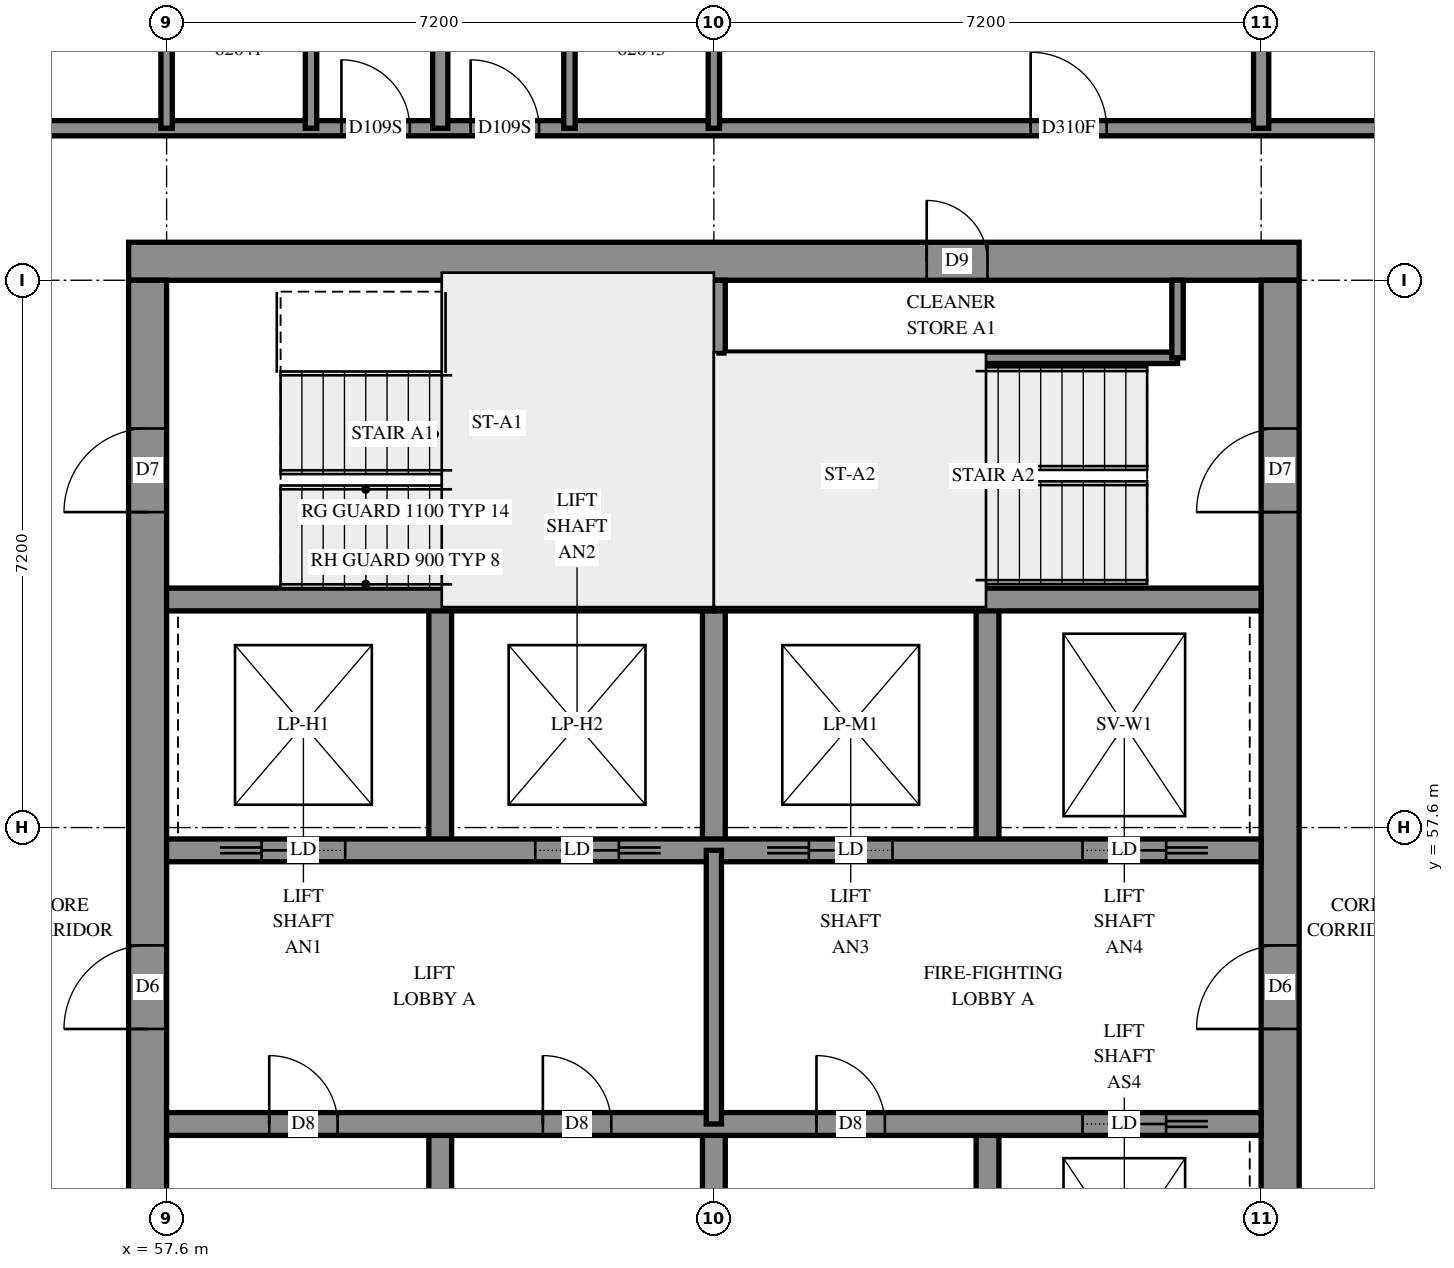
"""IFC4 building model, lengths in metres.
Left out: names, types, materials, properties, quantities, classifications, styles, units other than length and angle.
Written with IfcOpenShell. Run it as: python <this file> out.ifc"""

import sys

from ifc_helpers import new_model, si_unit, direction, frame, frame_2d, origin, place, context, subcontext, project, spatial, rectangle, extrude, element, fill, save


model = new_model("IFC4")
c1 = context("Model", 3, precision=1e-05, world=origin(), true_north=direction((0.0, 1.0)))
c2 = subcontext(c1, "Body", "Model", "MODEL_VIEW")
j1 = project(units=[si_unit("LENGTHUNIT", "METRE"), si_unit("PLANEANGLEUNIT", "RADIAN")], contexts=[c1])
p1 = place(None, origin())
s1 = spatial("IfcSite", under=j1, at=p1, CompositionType="ELEMENT")
p2 = place(p1, origin())
s2 = spatial("IfcBuilding", under=s1, at=p2, CompositionType="ELEMENT")
p3 = place(p2, frame((0.0, 0.0, 227.0)))
s3 = spatial("IfcBuildingStorey", under=s2, at=p3, CompositionType="ELEMENT", Elevation=227.0)
p4 = place(p3, frame((57.1, 65.05, -0.3), z_axis=(0.0, 0.0, 1.0), x_axis=(1.0, 0.0, 0.0)))
e1 = element("IfcWall", 1, at=p4, inside=s3, PredefinedType="SHEAR", context=c2, shape_type="SweptSolid", body=[
    extrude(rectangle(XDim=15.4, YDim=0.5, at=frame_2d((7.7, 0.0))), origin(), (0.0, 0.0, 1.0), 2.7),
])
p5 = place(p4, frame((10.5, 0.0, 0.3)))
e2 = element("IfcOpeningElement", 2, at=p5, cuts=e1, PredefinedType="OPENING", context=c2, shape_type="SweptSolid", body=[
    extrude(rectangle(XDim=0.8, YDim=2.1, at=frame_2d((0.4, 1.05))), frame((0.0, 0.26, 0.0), z_axis=(0.0, -1.0, 0.0), x_axis=(1.0, 0.0, 0.0)), (0.0, 0.0, 1.0), 0.52),
])
p6 = place(p3, frame((57.35, 50.4, -0.3), z_axis=(0.0, 0.0, 1.0), x_axis=(0.0, 1.0, 0.0)))
e3 = element("IfcWall", 3, at=p6, inside=s3, PredefinedType="SHEAR", context=c2, shape_type="SweptSolid", body=[
    extrude(rectangle(XDim=14.4, YDim=0.5, at=frame_2d((7.2, 0.0))), origin(), (0.0, 0.0, 1.0), 2.7),
])
p7 = place(p6, frame((4.55, 0.0, 0.3)))
e4 = element("IfcOpeningElement", 4, at=p7, cuts=e3, PredefinedType="OPENING", context=c2, shape_type="SweptSolid", body=[
    extrude(rectangle(XDim=1.1, YDim=2.1, at=frame_2d((0.55, 1.05))), frame((0.0, 0.26, 0.0), z_axis=(0.0, -1.0, 0.0), x_axis=(1.0, 0.0, 0.0)), (0.0, 0.0, 1.0), 0.52),
])
p8 = place(p6, frame((11.35, 0.0, 0.3)))
e5 = element("IfcOpeningElement", 5, at=p8, cuts=e3, PredefinedType="OPENING", context=c2, shape_type="SweptSolid", body=[
    extrude(rectangle(XDim=1.1, YDim=2.1, at=frame_2d((0.55, 1.05))), frame((0.0, 0.26, 0.0), z_axis=(0.0, -1.0, 0.0), x_axis=(1.0, 0.0, 0.0)), (0.0, 0.0, 1.0), 0.52),
])
p9 = place(p3, frame((72.25, 50.4, -0.3), z_axis=(0.0, 0.0, 1.0), x_axis=(0.0, 1.0, 0.0)))
e6 = element("IfcWall", 6, at=p9, inside=s3, PredefinedType="SHEAR", context=c2, shape_type="SweptSolid", body=[
    extrude(rectangle(XDim=14.4, YDim=0.5, at=frame_2d((7.2, 0.0))), origin(), (0.0, 0.0, 1.0), 2.7),
])
p10 = place(p9, frame((4.55, 0.0, 0.3)))
e7 = element("IfcOpeningElement", 7, at=p10, cuts=e6, PredefinedType="OPENING", context=c2, shape_type="SweptSolid", body=[
    extrude(rectangle(XDim=1.1, YDim=2.1, at=frame_2d((0.55, 1.05))), frame((0.0, 0.26, 0.0), z_axis=(0.0, -1.0, 0.0), x_axis=(1.0, 0.0, 0.0)), (0.0, 0.0, 1.0), 0.52),
])
p11 = place(p9, frame((11.35, 0.0, 0.3)))
e8 = element("IfcOpeningElement", 8, at=p11, cuts=e6, PredefinedType="OPENING", context=c2, shape_type="SweptSolid", body=[
    extrude(rectangle(XDim=1.1, YDim=2.1, at=frame_2d((0.55, 1.05))), frame((0.0, 0.26, 0.0), z_axis=(0.0, -1.0, 0.0), x_axis=(1.0, 0.0, 0.0)), (0.0, 0.0, 1.0), 0.52),
])
for number, where, z_axis, x_axis in (
    (9, (61.2, 50.4, 0.0), (0.0, 0.0, 1.0), (0.0, 1.0, 0.0)),
    (10, (61.2, 57.3, 0.0), (0.0, 0.0, 1.0), (0.0, 1.0, 0.0)),
    (11, (64.8, 50.4, 0.0), (0.0, 0.0, 1.0), (0.0, 1.0, 0.0)),
    (12, (64.8, 57.3, 0.0), (0.0, 0.0, 1.0), (0.0, 1.0, 0.0)),
    (13, (68.4, 50.4, 0.0), (0.0, 0.0, 1.0), (0.0, 1.0, 0.0)),
    (14, (68.4, 57.3, 0.0), (0.0, 0.0, 1.0), (0.0, 1.0, 0.0)),
):
    element("IfcWall", number, at=place(p3, frame(where, z_axis=z_axis, x_axis=x_axis)), inside=s3, PredefinedType="SOLIDWALL", context=c2, shape_type="SweptSolid", body=[
        extrude(rectangle(XDim=3.3, YDim=0.3, at=frame_2d((1.65, 0.0))), origin(), (0.0, 0.0, 1.0), 3.1),
    ])
p12 = place(p3, frame((57.6, 53.7, 0.0), z_axis=(0.0, 0.0, 1.0), x_axis=(1.0, 0.0, 0.0)))
e15 = element("IfcWall", 15, at=p12, inside=s3, PredefinedType="SOLIDWALL", context=c2, shape_type="SweptSolid", body=[
    extrude(rectangle(XDim=14.4, YDim=0.3, at=frame_2d((7.2, 0.0))), origin(), (0.0, 0.0, 1.0), 3.1),
])
p13 = place(p12, frame((1.35, 0.0, 0.0)))
e16 = element("IfcOpeningElement", 16, at=p13, cuts=e15, PredefinedType="OPENING", context=c2, shape_type="SweptSolid", body=[
    extrude(rectangle(XDim=0.9, YDim=2.1, at=frame_2d((0.45, 1.05))), frame((0.0, 0.16, 0.0), z_axis=(0.0, -1.0, 0.0), x_axis=(1.0, 0.0, 0.0)), (0.0, 0.0, 1.0), 0.32),
])
p14 = place(p12, frame((4.95, 0.0, 0.0)))
e17 = element("IfcOpeningElement", 17, at=p14, cuts=e15, PredefinedType="OPENING", context=c2, shape_type="SweptSolid", body=[
    extrude(rectangle(XDim=0.9, YDim=2.1, at=frame_2d((0.45, 1.05))), frame((0.0, 0.16, 0.0), z_axis=(0.0, -1.0, 0.0), x_axis=(1.0, 0.0, 0.0)), (0.0, 0.0, 1.0), 0.32),
])
p15 = place(p12, frame((8.55, 0.0, 0.0)))
e18 = element("IfcOpeningElement", 18, at=p15, cuts=e15, PredefinedType="OPENING", context=c2, shape_type="SweptSolid", body=[
    extrude(rectangle(XDim=0.9, YDim=2.1, at=frame_2d((0.45, 1.05))), frame((0.0, 0.16, 0.0), z_axis=(0.0, -1.0, 0.0), x_axis=(1.0, 0.0, 0.0)), (0.0, 0.0, 1.0), 0.32),
])
p16 = place(p12, frame((12.05, 0.0, 0.0)))
e19 = element("IfcOpeningElement", 19, at=p16, cuts=e15, PredefinedType="OPENING", context=c2, shape_type="SweptSolid", body=[
    extrude(rectangle(XDim=1.1, YDim=2.1, at=frame_2d((0.55, 1.05))), frame((0.0, 0.16, 0.0), z_axis=(0.0, -1.0, 0.0), x_axis=(1.0, 0.0, 0.0)), (0.0, 0.0, 1.0), 0.32),
])
p17 = place(p3, frame((57.6, 57.3, 0.0), z_axis=(0.0, 0.0, 1.0), x_axis=(1.0, 0.0, 0.0)))
e20 = element("IfcWall", 20, at=p17, inside=s3, PredefinedType="SOLIDWALL", context=c2, shape_type="SweptSolid", body=[
    extrude(rectangle(XDim=14.4, YDim=0.3, at=frame_2d((7.2, 0.0))), origin(), (0.0, 0.0, 1.0), 3.1),
])
p18 = place(p17, frame((1.25, 0.0, 0.0)))
e21 = element("IfcOpeningElement", 21, at=p18, cuts=e20, PredefinedType="OPENING", context=c2, shape_type="SweptSolid", body=[
    extrude(rectangle(XDim=1.1, YDim=2.1, at=frame_2d((0.55, 1.05))), frame((0.0, 0.16, 0.0), z_axis=(0.0, -1.0, 0.0), x_axis=(1.0, 0.0, 0.0)), (0.0, 0.0, 1.0), 0.32),
])
p19 = place(p17, frame((4.85, 0.0, 0.0)))
e22 = element("IfcOpeningElement", 22, at=p19, cuts=e20, PredefinedType="OPENING", context=c2, shape_type="SweptSolid", body=[
    extrude(rectangle(XDim=1.1, YDim=2.1, at=frame_2d((0.55, 1.05))), frame((0.0, 0.16, 0.0), z_axis=(0.0, -1.0, 0.0), x_axis=(1.0, 0.0, 0.0)), (0.0, 0.0, 1.0), 0.32),
])
p20 = place(p17, frame((8.45, 0.0, 0.0)))
e23 = element("IfcOpeningElement", 23, at=p20, cuts=e20, PredefinedType="OPENING", context=c2, shape_type="SweptSolid", body=[
    extrude(rectangle(XDim=1.1, YDim=2.1, at=frame_2d((0.55, 1.05))), frame((0.0, 0.16, 0.0), z_axis=(0.0, -1.0, 0.0), x_axis=(1.0, 0.0, 0.0)), (0.0, 0.0, 1.0), 0.32),
])
p21 = place(p17, frame((12.05, 0.0, 0.0)))
e24 = element("IfcOpeningElement", 24, at=p21, cuts=e20, PredefinedType="OPENING", context=c2, shape_type="SweptSolid", body=[
    extrude(rectangle(XDim=1.1, YDim=2.1, at=frame_2d((0.55, 1.05))), frame((0.0, 0.16, 0.0), z_axis=(0.0, -1.0, 0.0), x_axis=(1.0, 0.0, 0.0)), (0.0, 0.0, 1.0), 0.32),
])
for number, where, z_axis, x_axis in (
    (25, (57.6, 60.6, 0.0), (0.0, 0.0, 1.0), (1.0, 0.0, 0.0)),
    (26, (64.8, 60.6, 0.0), (0.0, 0.0, 1.0), (1.0, 0.0, 0.0)),
):
    element("IfcWall", number, at=place(p3, frame(where, z_axis=z_axis, x_axis=x_axis)), inside=s3, PredefinedType="SOLIDWALL", context=c2, shape_type="SweptSolid", body=[
        extrude(rectangle(XDim=7.2, YDim=0.3, at=frame_2d((3.6, 0.0))), origin(), (0.0, 0.0, 1.0), 3.1),
    ])
p22 = place(p3, frame((64.8, 60.6, 0.0), z_axis=(0.0, 0.0, 1.0), x_axis=(0.0, 1.0, 0.0)))
e27 = element("IfcWall", 27, at=p22, inside=s3, PredefinedType="SOLIDWALL", context=c2, shape_type="SweptSolid", body=[
    extrude(rectangle(XDim=4.2, YDim=0.3, at=frame_2d((2.1, 0.0))), origin(), (0.0, 0.0, 1.0), 3.1),
])
p23 = place(p3, frame((64.95, 63.78, 0.0), z_axis=(0.0, 0.0, 1.0), x_axis=(1.0, 0.0, 0.0)))
e28 = element("IfcWall", 28, at=p23, inside=s3, PredefinedType="PARTITIONING", context=c2, shape_type="SweptSolid", body=[
    extrude(rectangle(XDim=5.95, YDim=0.15, at=frame_2d((2.975, 0.0))), origin(), (0.0, 0.0, 1.0), 3.1),
])
p24 = place(p3, frame((70.9, 63.78, 0.0), z_axis=(0.0, 0.0, 1.0), x_axis=(0.0, 1.0, 0.0)))
e29 = element("IfcWall", 29, at=p24, inside=s3, PredefinedType="PARTITIONING", context=c2, shape_type="SweptSolid", body=[
    extrude(rectangle(XDim=1.02, YDim=0.15, at=frame_2d((0.51, 0.0))), origin(), (0.0, 0.0, 1.0), 3.1),
])
p25 = place(p3, frame((64.8, 53.7, 0.0), z_axis=(0.0, 0.0, 1.0), x_axis=(0.0, 1.0, 0.0)))
e30 = element("IfcWall", 30, at=p25, inside=s3, PredefinedType="PARTITIONING", context=c2, shape_type="SweptSolid", body=[
    extrude(rectangle(XDim=3.6, YDim=0.2, at=frame_2d((1.8, 0.0))), origin(), (0.0, 0.0, 1.0), 3.1),
])
p26 = place(p3, frame((55.6, 66.8, 0.0), z_axis=(0.0, 0.0, 1.0), x_axis=(1.0, 0.0, 0.0)))
e31 = element("IfcWall", 31, at=p26, inside=s3, PredefinedType="PARTITIONING", context=c2, shape_type="SweptSolid", body=[
    extrude(rectangle(XDim=18.4, YDim=0.2, at=frame_2d((9.2, 0.0))), origin(), (0.0, 0.0, 1.0), 3.1),
])
p27 = place(p26, frame((4.3, 0.0, 0.0)))
e32 = element("IfcOpeningElement", 32, at=p27, cuts=e31, PredefinedType="OPENING", context=c2, shape_type="SweptSolid", body=[
    extrude(rectangle(XDim=0.9, YDim=2.1, at=frame_2d((0.45, 1.05))), frame((0.0, 0.11, 0.0), z_axis=(0.0, -1.0, 0.0), x_axis=(1.0, 0.0, 0.0)), (0.0, 0.0, 1.0), 0.22),
])
p28 = place(p26, frame((6.0, 0.0, 0.0)))
e33 = element("IfcOpeningElement", 33, at=p28, cuts=e31, PredefinedType="OPENING", context=c2, shape_type="SweptSolid", body=[
    extrude(rectangle(XDim=0.9, YDim=2.1, at=frame_2d((0.45, 1.05))), frame((0.0, 0.11, 0.0), z_axis=(0.0, -1.0, 0.0), x_axis=(1.0, 0.0, 0.0)), (0.0, 0.0, 1.0), 0.22),
])
p29 = place(p26, frame((13.367, 0.0, 0.0)))
e34 = element("IfcOpeningElement", 34, at=p29, cuts=e31, PredefinedType="OPENING", context=c2, shape_type="SweptSolid", body=[
    extrude(rectangle(XDim=1.0, YDim=2.1, at=frame_2d((0.5, 1.05))), frame((0.0, 0.11, 0.0), z_axis=(0.0, -1.0, 0.0), x_axis=(1.0, 0.0, 0.0)), (0.0, 0.0, 1.0), 0.22),
])
p30 = place(p3, frame((61.2, 66.8, 0.0), z_axis=(0.0, 0.0, 1.0), x_axis=(0.0, 1.0, 0.0)))
e35 = element("IfcWall", 35, at=p30, inside=s3, PredefinedType="PARTITIONING", context=c2, shape_type="SweptSolid", body=[
    extrude(rectangle(XDim=5.93, YDim=0.2, at=frame_2d((2.965, 0.0))), origin(), (0.0, 0.0, 1.0), 3.1),
])
p31 = place(p3, frame((72.0, 66.8, 0.0), z_axis=(0.0, 0.0, 1.0), x_axis=(0.0, 1.0, 0.0)))
e36 = element("IfcWall", 36, at=p31, inside=s3, PredefinedType="PARTITIONING", context=c2, shape_type="SweptSolid", body=[
    extrude(rectangle(XDim=4.696, YDim=0.2, at=frame_2d((2.348, 0.0))), origin(), (0.0, 0.0, 1.0), 3.1),
])
for number, where, z_axis, x_axis in (
    (37, (57.6, 66.8, 0.0), (0.0, 0.0, 1.0), (0.0, 1.0, 0.0)),
    (38, (59.5, 66.8, 0.0), (0.0, 0.0, 1.0), (0.0, 1.0, 0.0)),
    (39, (62.9, 66.8, 0.0), (0.0, 0.0, 1.0), (0.0, 1.0, 0.0)),
    (40, (64.8, 66.8, 0.0), (0.0, 0.0, 1.0), (0.0, 1.0, 0.0)),
):
    element("IfcWall", number, at=place(p3, frame(where, z_axis=z_axis, x_axis=x_axis)), inside=s3, PredefinedType="PARTITIONING", context=c2, shape_type="SweptSolid", body=[
        extrude(rectangle(XDim=2.4, YDim=0.15, at=frame_2d((1.2, 0.0))), origin(), (0.0, 0.0, 1.0), 3.1),
    ])
p32 = place(p5, origin())
e41 = element("IfcDoor", 41, at=p32, inside=s3, OperationType="SINGLE_SWING_RIGHT", PredefinedType="DOOR", context=c2, shape_type="SweptSolid", body=[
    extrude(rectangle(XDim=0.8, YDim=2.1, at=frame_2d((0.4, 1.05))), frame((0.0, 0.025, 0.0), z_axis=(0.0, -1.0, 0.0), x_axis=(1.0, 0.0, 0.0)), (0.0, 0.0, 1.0), 0.05),
])
fill(e2, e41)
p33 = place(p7, origin())
e42 = element("IfcDoor", 42, at=p33, inside=s3, OperationType="DOUBLE_DOOR_SINGLE_SWING", PredefinedType="DOOR", context=c2, shape_type="SweptSolid", body=[
    extrude(rectangle(XDim=1.1, YDim=2.1, at=frame_2d((0.55, 1.05))), frame((0.0, 0.025, 0.0), z_axis=(0.0, -1.0, 0.0), x_axis=(1.0, 0.0, 0.0)), (0.0, 0.0, 1.0), 0.05),
])
fill(e4, e42)
p34 = place(p10, origin())
e43 = element("IfcDoor", 43, at=p34, inside=s3, OperationType="DOUBLE_DOOR_SINGLE_SWING", PredefinedType="DOOR", context=c2, shape_type="SweptSolid", body=[
    extrude(rectangle(XDim=1.1, YDim=2.1, at=frame_2d((0.55, 1.05))), frame((0.0, 0.025, 0.0), z_axis=(0.0, -1.0, 0.0), x_axis=(1.0, 0.0, 0.0)), (0.0, 0.0, 1.0), 0.05),
])
fill(e7, e43)
p35 = place(p8, origin())
e44 = element("IfcDoor", 44, at=p35, inside=s3, OperationType="SINGLE_SWING_LEFT", PredefinedType="DOOR", context=c2, shape_type="SweptSolid", body=[
    extrude(rectangle(XDim=1.1, YDim=2.1, at=frame_2d((0.55, 1.05))), frame((0.0, 0.025, 0.0), z_axis=(0.0, -1.0, 0.0), x_axis=(1.0, 0.0, 0.0)), (0.0, 0.0, 1.0), 0.05),
])
fill(e5, e44)
p36 = place(p11, origin())
e45 = element("IfcDoor", 45, at=p36, inside=s3, OperationType="SINGLE_SWING_RIGHT", PredefinedType="DOOR", context=c2, shape_type="SweptSolid", body=[
    extrude(rectangle(XDim=1.1, YDim=2.1, at=frame_2d((0.55, 1.05))), frame((0.0, 0.025, 0.0), z_axis=(0.0, -1.0, 0.0), x_axis=(1.0, 0.0, 0.0)), (0.0, 0.0, 1.0), 0.05),
])
fill(e8, e45)
p37 = place(p13, origin())
e46 = element("IfcDoor", 46, at=p37, inside=s3, OperationType="SINGLE_SWING_LEFT", PredefinedType="DOOR", context=c2, shape_type="SweptSolid", body=[
    extrude(rectangle(XDim=0.9, YDim=2.1, at=frame_2d((0.45, 1.05))), frame((0.0, 0.025, 0.0), z_axis=(0.0, -1.0, 0.0), x_axis=(1.0, 0.0, 0.0)), (0.0, 0.0, 1.0), 0.05),
])
fill(e16, e46)
p38 = place(p14, origin())
e47 = element("IfcDoor", 47, at=p38, inside=s3, OperationType="SINGLE_SWING_LEFT", PredefinedType="DOOR", context=c2, shape_type="SweptSolid", body=[
    extrude(rectangle(XDim=0.9, YDim=2.1, at=frame_2d((0.45, 1.05))), frame((0.0, 0.025, 0.0), z_axis=(0.0, -1.0, 0.0), x_axis=(1.0, 0.0, 0.0)), (0.0, 0.0, 1.0), 0.05),
])
fill(e17, e47)
p39 = place(p15, origin())
e48 = element("IfcDoor", 48, at=p39, inside=s3, OperationType="SINGLE_SWING_LEFT", PredefinedType="DOOR", context=c2, shape_type="SweptSolid", body=[
    extrude(rectangle(XDim=0.9, YDim=2.1, at=frame_2d((0.45, 1.05))), frame((0.0, 0.025, 0.0), z_axis=(0.0, -1.0, 0.0), x_axis=(1.0, 0.0, 0.0)), (0.0, 0.0, 1.0), 0.05),
])
fill(e18, e48)
p40 = place(p16, origin())
e49 = element("IfcDoor", 49, at=p40, inside=s3, OperationType="SLIDING_TO_RIGHT", PredefinedType="DOOR", context=c2, shape_type="SweptSolid", body=[
    extrude(rectangle(XDim=1.1, YDim=2.1, at=frame_2d((0.55, 1.05))), frame((0.0, 0.025, 0.0), z_axis=(0.0, -1.0, 0.0), x_axis=(1.0, 0.0, 0.0)), (0.0, 0.0, 1.0), 0.05),
])
fill(e19, e49)
p41 = place(p18, origin())
e50 = element("IfcDoor", 50, at=p41, inside=s3, OperationType="SLIDING_TO_LEFT", PredefinedType="DOOR", context=c2, shape_type="SweptSolid", body=[
    extrude(rectangle(XDim=1.1, YDim=2.1, at=frame_2d((0.55, 1.05))), frame((0.0, 0.025, 0.0), z_axis=(0.0, -1.0, 0.0), x_axis=(1.0, 0.0, 0.0)), (0.0, 0.0, 1.0), 0.05),
])
fill(e21, e50)
p42 = place(p19, origin())
e51 = element("IfcDoor", 51, at=p42, inside=s3, OperationType="SLIDING_TO_RIGHT", PredefinedType="DOOR", context=c2, shape_type="SweptSolid", body=[
    extrude(rectangle(XDim=1.1, YDim=2.1, at=frame_2d((0.55, 1.05))), frame((0.0, 0.025, 0.0), z_axis=(0.0, -1.0, 0.0), x_axis=(1.0, 0.0, 0.0)), (0.0, 0.0, 1.0), 0.05),
])
fill(e22, e51)
p43 = place(p20, origin())
e52 = element("IfcDoor", 52, at=p43, inside=s3, OperationType="SLIDING_TO_LEFT", PredefinedType="DOOR", context=c2, shape_type="SweptSolid", body=[
    extrude(rectangle(XDim=1.1, YDim=2.1, at=frame_2d((0.55, 1.05))), frame((0.0, 0.025, 0.0), z_axis=(0.0, -1.0, 0.0), x_axis=(1.0, 0.0, 0.0)), (0.0, 0.0, 1.0), 0.05),
])
fill(e23, e52)
p44 = place(p21, origin())
e53 = element("IfcDoor", 53, at=p44, inside=s3, OperationType="SLIDING_TO_RIGHT", PredefinedType="DOOR", context=c2, shape_type="SweptSolid", body=[
    extrude(rectangle(XDim=1.1, YDim=2.1, at=frame_2d((0.55, 1.05))), frame((0.0, 0.025, 0.0), z_axis=(0.0, -1.0, 0.0), x_axis=(1.0, 0.0, 0.0)), (0.0, 0.0, 1.0), 0.05),
])
fill(e24, e53)
p45 = place(p27, origin())
e54 = element("IfcDoor", 54, at=p45, inside=s3, OperationType="SINGLE_SWING_RIGHT", PredefinedType="DOOR", context=c2, shape_type="SweptSolid", body=[
    extrude(rectangle(XDim=0.9, YDim=2.1, at=frame_2d((0.45, 1.05))), frame((0.0, 0.025, 0.0), z_axis=(0.0, -1.0, 0.0), x_axis=(1.0, 0.0, 0.0)), (0.0, 0.0, 1.0), 0.05),
])
fill(e32, e54)
p46 = place(p28, origin())
e55 = element("IfcDoor", 55, at=p46, inside=s3, OperationType="SINGLE_SWING_LEFT", PredefinedType="DOOR", context=c2, shape_type="SweptSolid", body=[
    extrude(rectangle(XDim=0.9, YDim=2.1, at=frame_2d((0.45, 1.05))), frame((0.0, 0.025, 0.0), z_axis=(0.0, -1.0, 0.0), x_axis=(1.0, 0.0, 0.0)), (0.0, 0.0, 1.0), 0.05),
])
fill(e33, e55)
p47 = place(p29, origin())
e56 = element("IfcDoor", 56, at=p47, inside=s3, OperationType="SINGLE_SWING_RIGHT", PredefinedType="DOOR", context=c2, shape_type="SweptSolid", body=[
    extrude(rectangle(XDim=1.0, YDim=2.1, at=frame_2d((0.5, 1.05))), frame((0.0, 0.025, 0.0), z_axis=(0.0, -1.0, 0.0), x_axis=(1.0, 0.0, 0.0)), (0.0, 0.0, 1.0), 0.05),
])
fill(e34, e56)
save(model, sys.argv[1])
